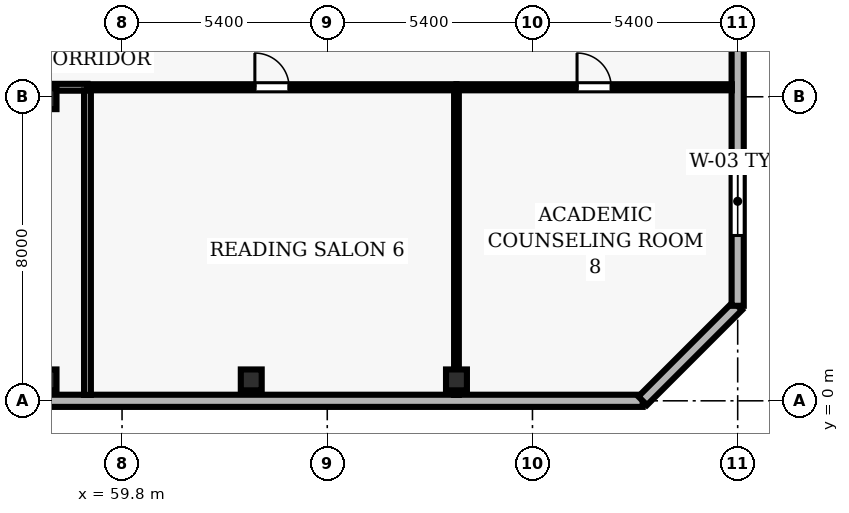
"""IFC4 building model, lengths in metres.
Left out: names, types, materials, properties, quantities, classifications, styles, units other than length and angle.
Written with IfcOpenShell. Run it as: python <this file> out.ifc"""

import sys

from ifc_helpers import new_model, si_unit, direction, frame, frame_2d, origin, origin_2d, place, context, subcontext, project, spatial, rectangle, hollow_rectangle, extrude, element, fill, save


model = new_model("IFC4")
c1 = context("Model", 3, precision=1e-05, world=origin(), true_north=direction((0.0, 1.0)))
c2 = subcontext(c1, "Body", "Model", "MODEL_VIEW")
j1 = project(units=[si_unit("LENGTHUNIT", "METRE"), si_unit("PLANEANGLEUNIT", "RADIAN")], contexts=[c1])
p1 = place(None, origin())
s1 = spatial("IfcSite", under=j1, at=p1, CompositionType="ELEMENT")
p2 = place(p1, origin())
s2 = spatial("IfcBuilding", under=s1, at=p2, CompositionType="ELEMENT")
p3 = place(p2, frame((0.0, 0.0, 54.4)))
s3 = spatial("IfcBuildingStorey", under=s2, at=p3, CompositionType="ELEMENT", Elevation=54.4)
for number, where, z_axis, x_axis in (
    (1, (57.8, 0.55, 0.0), (0.0, 0.0, 1.0), (1.0, 0.0, 0.0)),
    (2, (57.8, 7.95, 0.0), (0.0, 0.0, 1.0), (1.0, 0.0, 0.0)),
    (3, (63.2, 0.55, 0.0), (0.0, 0.0, 1.0), (1.0, 0.0, 0.0)),
    (4, (68.6, 0.55, 0.0), (0.0, 0.0, 1.0), (1.0, 0.0, 0.0)),
):
    element("IfcColumn", number, at=place(p3, frame(where, z_axis=z_axis, x_axis=x_axis)), inside=s3, PredefinedType="COLUMN", context=c2, shape_type="SweptSolid", body=[
        extrude(hollow_rectangle(XDim=0.55, YDim=0.55, WallThickness=0.025, at=origin_2d()), origin(), (0.0, 0.0, 1.0), 3.9),
    ])
p4 = place(p3, frame((57.275, 0.0, 0.0), z_axis=(0.0, 0.0, 1.0), x_axis=(1.0, 0.0, 0.0)))
e5 = element("IfcWall", 5, at=p4, inside=s3, PredefinedType="SOLIDWALL", context=c2, shape_type="SweptSolid", body=[
    extrude(rectangle(XDim=16.225, YDim=0.32, at=frame_2d((8.113, 0.0))), origin(), (0.0, 0.0, 1.0), 3.69),
])
p5 = place(p3, frame((73.5, 0.0, 0.0), z_axis=(0.0, 0.0, 1.0), x_axis=(0.707106781187, 0.707106781187, 0.0)))
e6 = element("IfcWall", 6, at=p5, inside=s3, PredefinedType="SOLIDWALL", context=c2, shape_type="SweptSolid", body=[
    extrude(rectangle(XDim=3.536, YDim=0.32, at=frame_2d((1.768, 0.0))), origin(), (0.0, 0.0, 1.0), 3.69),
])
p6 = place(p3, frame((76.0, 2.5, 0.0), z_axis=(0.0, 0.0, 1.0), x_axis=(0.0, 1.0, 0.0)))
e7 = element("IfcWall", 7, at=p6, inside=s3, PredefinedType="SOLIDWALL", context=c2, shape_type="SweptSolid", body=[
    extrude(rectangle(XDim=11.0, YDim=0.32, at=frame_2d((5.5, 0.0))), origin(), (0.0, 0.0, 1.0), 3.69),
])
p7 = place(p6, frame((1.85, 0.0, 0.9)))
e8 = element("IfcOpeningElement", 8, at=p7, cuts=e7, PredefinedType="OPENING", context=c2, shape_type="SweptSolid", body=[
    extrude(rectangle(XDim=1.8, YDim=1.6, at=frame_2d((0.9, 0.8))), frame((0.0, 0.17, 0.0), z_axis=(0.0, -1.0, 0.0), x_axis=(1.0, 0.0, 0.0)), (0.0, 0.0, 1.0), 0.34),
])
p8 = place(p3, frame((49.26, 8.25, 0.0), z_axis=(0.0, 0.0, 1.0), x_axis=(1.0, 0.0, 0.0)))
e9 = element("IfcWall", 9, at=p8, inside=s3, PredefinedType="PARTITIONING", context=c2, shape_type="SweptSolid", body=[
    extrude(rectangle(XDim=9.63, YDim=0.18, at=frame_2d((4.815, 0.0))), origin(), (0.0, 0.0, 1.0), 2.995),
])
p9 = place(p8, frame((4.34, 0.0, 0.0)))
e10 = element("IfcOpeningElement", 10, at=p9, cuts=e9, PredefinedType="OPENING", context=c2, shape_type="SweptSolid", body=[
    extrude(rectangle(XDim=0.95, YDim=2.1, at=frame_2d((0.475, 1.05))), frame((0.0, 0.1, 0.0), z_axis=(0.0, -1.0, 0.0), x_axis=(1.0, 0.0, 0.0)), (0.0, 0.0, 1.0), 0.2),
])
p10 = place(p3, frame((58.89, 8.25, 0.0), z_axis=(0.0, 0.0, 1.0), x_axis=(1.0, 0.0, 0.0)))
e11 = element("IfcWall", 11, at=p10, inside=s3, PredefinedType="PARTITIONING", context=c2, shape_type="SweptSolid", body=[
    extrude(rectangle(XDim=9.71, YDim=0.16, at=frame_2d((4.855, 0.0))), origin(), (0.0, 0.0, 1.0), 3.69),
])
p11 = place(p10, frame((4.405, 0.0, 0.0)))
e12 = element("IfcOpeningElement", 12, at=p11, cuts=e11, PredefinedType="OPENING", context=c2, shape_type="SweptSolid", body=[
    extrude(rectangle(XDim=0.9, YDim=2.1, at=frame_2d((0.45, 1.05))), frame((0.0, 0.09, 0.0), z_axis=(0.0, -1.0, 0.0), x_axis=(1.0, 0.0, 0.0)), (0.0, 0.0, 1.0), 0.18),
])
p12 = place(p3, frame((68.6, 8.25, 0.0), z_axis=(0.0, 0.0, 1.0), x_axis=(1.0, 0.0, 0.0)))
e13 = element("IfcWall", 13, at=p12, inside=s3, PredefinedType="PARTITIONING", context=c2, shape_type="SweptSolid", body=[
    extrude(rectangle(XDim=7.245, YDim=0.16, at=frame_2d((3.623, 0.0))), origin(), (0.0, 0.0, 1.0), 3.69),
])
p13 = place(p12, frame((3.173, 0.0, 0.0)))
e14 = element("IfcOpeningElement", 14, at=p13, cuts=e13, PredefinedType="OPENING", context=c2, shape_type="SweptSolid", body=[
    extrude(rectangle(XDim=0.9, YDim=2.1, at=frame_2d((0.45, 1.05))), frame((0.0, 0.09, 0.0), z_axis=(0.0, -1.0, 0.0), x_axis=(1.0, 0.0, 0.0)), (0.0, 0.0, 1.0), 0.18),
])
p14 = place(p3, frame((58.89, 0.155, 0.0), z_axis=(0.0, 0.0, 1.0), x_axis=(0.0, 1.0, 0.0)))
e15 = element("IfcWall", 15, at=p14, inside=s3, PredefinedType="PARTITIONING", context=c2, shape_type="SweptSolid", body=[
    extrude(rectangle(XDim=8.01, YDim=0.18, at=frame_2d((4.005, 0.0))), origin(), (0.0, 0.0, 1.0), 3.69),
])
p15 = place(p3, frame((68.6, 0.155, 0.0), z_axis=(0.0, 0.0, 1.0), x_axis=(0.0, 1.0, 0.0)))
e16 = element("IfcWall", 16, at=p15, inside=s3, PredefinedType="PARTITIONING", context=c2, shape_type="SweptSolid", body=[
    extrude(rectangle(XDim=8.02, YDim=0.125, at=frame_2d((4.01, 0.0))), origin(), (0.0, 0.0, 1.0), 2.995),
])
p16 = place(p7, origin())
e17 = element("IfcWindow", 17, at=p16, inside=s3, PartitioningType="SINGLE_PANEL", PredefinedType="WINDOW", context=c2, shape_type="SweptSolid", body=[
    extrude(rectangle(XDim=1.8, YDim=1.6, at=frame_2d((0.9, 0.8))), frame((0.0, 0.03, 0.0), z_axis=(0.0, -1.0, 0.0), x_axis=(1.0, 0.0, 0.0)), (0.0, 0.0, 1.0), 0.06),
])
fill(e8, e17)
p17 = place(p11, origin())
e18 = element("IfcDoor", 18, at=p17, inside=s3, OperationType="SINGLE_SWING_LEFT", PredefinedType="DOOR", context=c2, shape_type="SweptSolid", body=[
    extrude(rectangle(XDim=0.9, YDim=2.1, at=frame_2d((0.45, 1.05))), frame((0.0, 0.025, 0.0), z_axis=(0.0, -1.0, 0.0), x_axis=(1.0, 0.0, 0.0)), (0.0, 0.0, 1.0), 0.05),
])
fill(e12, e18)
p18 = place(p13, origin())
e19 = element("IfcDoor", 19, at=p18, inside=s3, OperationType="SINGLE_SWING_LEFT", PredefinedType="DOOR", context=c2, shape_type="SweptSolid", body=[
    extrude(rectangle(XDim=0.9, YDim=2.1, at=frame_2d((0.45, 1.05))), frame((0.0, 0.025, 0.0), z_axis=(0.0, -1.0, 0.0), x_axis=(1.0, 0.0, 0.0)), (0.0, 0.0, 1.0), 0.05),
])
fill(e14, e19)
save(model, sys.argv[1])
